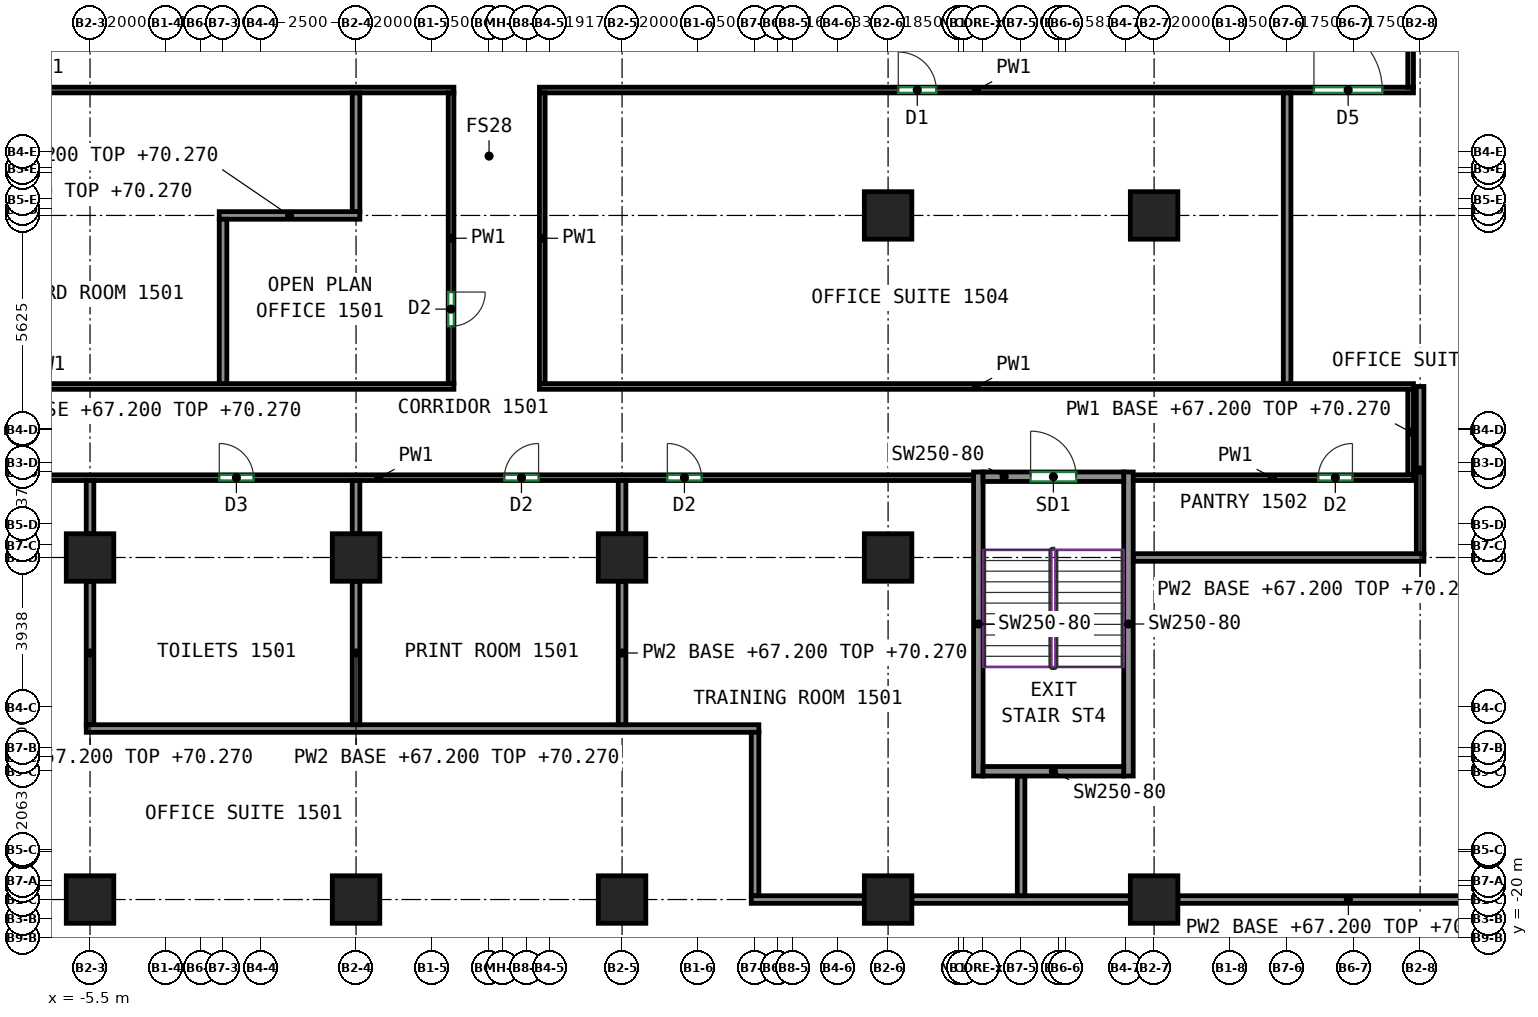
"""IFC4 building model, lengths in metres.
Left out: names, types, materials, properties, quantities, classifications, styles, units other than length and angle.
Written with IfcOpenShell. Run it as: python <this file> out.ifc"""

import sys

from ifc_helpers import new_model, si_unit, direction, frame, frame_2d, origin, origin_2d, place, context, subcontext, project, spatial, rectangle, extrude, source, transform, mapped, element, fill, save


model = new_model("IFC4")
c1 = context("Model", 3, precision=1e-05, world=origin(), true_north=direction((0.0, 1.0)))
c2 = subcontext(c1, "Body", "Model", "MODEL_VIEW")
j1 = project(units=[si_unit("LENGTHUNIT", "METRE"), si_unit("PLANEANGLEUNIT", "RADIAN")], contexts=[c1])
p1 = place(None, origin())
s1 = spatial("IfcSite", under=j1, at=p1, CompositionType="ELEMENT")
p2 = place(p1, origin())
s2 = spatial("IfcBuilding", under=s1, at=p2, CompositionType="ELEMENT")
p3 = place(p2, frame((0.0, 0.0, 67.2)))
s3 = spatial("IfcBuildingStorey", under=s2, at=p3, CompositionType="ELEMENT", Elevation=67.2)
m1 = source(origin(), c2, "Body", "SweptSolid", [
    extrude(rectangle(XDim=1.25, YDim=1.25, at=origin_2d()), origin(), (0.0, 0.0, 1.0), 3.72),
])
for number, where, z_axis, x_axis in (
    (1, (-5.5, -19.0, 0.0), (0.0, 0.0, 1.0), (1.0, 0.0, 0.0)),
    (2, (-5.5, -10.0, 0.0), (0.0, 0.0, 1.0), (1.0, 0.0, 0.0)),
    (3, (1.5, -19.0, 0.0), (0.0, 0.0, 1.0), (1.0, 0.0, 0.0)),
    (4, (1.5, -10.0, 0.0), (0.0, 0.0, 1.0), (1.0, 0.0, 0.0)),
    (5, (8.5, -19.0, 0.0), (0.0, 0.0, 1.0), (1.0, 0.0, 0.0)),
    (6, (8.5, -10.0, 0.0), (0.0, 0.0, 1.0), (1.0, 0.0, 0.0)),
    (7, (15.5, -19.0, 0.0), (0.0, 0.0, 1.0), (1.0, 0.0, 0.0)),
    (8, (15.5, -10.0, 0.0), (0.0, 0.0, 1.0), (1.0, 0.0, 0.0)),
    (9, (15.5, -1.0, 0.0), (0.0, 0.0, 1.0), (1.0, 0.0, 0.0)),
    (10, (22.5, -19.0, 0.0), (0.0, 0.0, 1.0), (1.0, 0.0, 0.0)),
    (11, (22.5, -1.0, 0.0), (0.0, 0.0, 1.0), (1.0, 0.0, 0.0)),
):
    element("IfcColumn", number, at=place(p3, frame(where, z_axis=z_axis, x_axis=x_axis)), inside=s3, PredefinedType="COLUMN", context=c2, shape_type="MappedRepresentation", body=[
        mapped(m1, transform((0.0, 0.0, 0.0))),
    ])
m2 = source(origin(), c2, "Body", "SweptSolid", [
    extrude(rectangle(XDim=8.0, YDim=0.25, at=frame_2d((4.0, 0.0))), origin(), (0.0, 0.0, 1.0), 3.72),
])
for number, where, z_axis, x_axis in (
    (12, (17.875, -15.75, 0.0), (0.0, 0.0, 1.0), (0.0, 1.0, 0.0)),
    (13, (21.825, -15.75, 0.0), (0.0, 0.0, 1.0), (0.0, 1.0, 0.0)),
):
    element("IfcWall", number, at=place(p3, frame(where, z_axis=z_axis, x_axis=x_axis)), inside=s3, PredefinedType="SHEAR", context=c2, shape_type="MappedRepresentation", body=[
        mapped(m2, transform((0.0, 0.0, 0.0))),
    ])
m3 = source(origin(), c2, "Body", "SweptSolid", [
    extrude(rectangle(XDim=3.7, YDim=0.25, at=frame_2d((1.85, 0.0))), origin(), (0.0, 0.0, 1.0), 3.72),
])
p4 = place(p3, frame((18.0, -15.625, 0.0), z_axis=(0.0, 0.0, 1.0), x_axis=(1.0, 0.0, 0.0)))
e14 = element("IfcWall", 14, at=p4, inside=s3, PredefinedType="SHEAR", context=c2, shape_type="MappedRepresentation", body=[
    mapped(m3, transform((0.0, 0.0, 0.0))),
])
p5 = place(p3, frame((18.0, -7.875, 0.0), z_axis=(0.0, 0.0, 1.0), x_axis=(1.0, 0.0, 0.0)))
e15 = element("IfcWall", 15, at=p5, inside=s3, PredefinedType="SHEAR", context=c2, shape_type="MappedRepresentation", body=[
    mapped(m3, transform((0.0, 0.0, 0.0))),
])
p6 = place(p5, frame((1.25, 0.0, 0.0)))
e16 = element("IfcOpeningElement", 16, at=p6, cuts=e15, PredefinedType="OPENING", context=c2, shape_type="SweptSolid", body=[
    extrude(rectangle(XDim=1.2, YDim=2.1, at=frame_2d((0.6, 1.05))), frame((0.0, 0.135, 0.0), z_axis=(0.0, -1.0, 0.0), x_axis=(1.0, 0.0, 0.0)), (0.0, 0.0, 1.0), 0.27),
])
p7 = place(p3, frame((-13.6, -7.9, 0.0), z_axis=(0.0, 0.0, 1.0), x_axis=(1.0, 0.0, 0.0)))
e17 = element("IfcWall", 17, at=p7, inside=s3, PredefinedType="PARTITIONING", context=c2, shape_type="SweptSolid", body=[
    extrude(rectangle(XDim=31.4, YDim=0.15, at=frame_2d((15.7, 0.0))), origin(), (0.0, 0.0, 1.0), 3.72),
])
p8 = place(p7, frame((11.501, 0.0, 0.0)))
e18 = element("IfcOpeningElement", 18, at=p8, cuts=e17, PredefinedType="OPENING", context=c2, shape_type="SweptSolid", body=[
    extrude(rectangle(XDim=0.9, YDim=2.1, at=frame_2d((0.45, 1.05))), frame((0.0, 0.085, 0.0), z_axis=(0.0, -1.0, 0.0), x_axis=(1.0, 0.0, 0.0)), (0.0, 0.0, 1.0), 0.17),
])
p9 = place(p7, frame((19.003, 0.0, 0.0)))
e19 = element("IfcOpeningElement", 19, at=p9, cuts=e17, PredefinedType="OPENING", context=c2, shape_type="SweptSolid", body=[
    extrude(rectangle(XDim=0.9, YDim=2.1, at=frame_2d((0.45, 1.05))), frame((0.0, 0.085, 0.0), z_axis=(0.0, -1.0, 0.0), x_axis=(1.0, 0.0, 0.0)), (0.0, 0.0, 1.0), 0.17),
])
p10 = place(p7, frame((23.291, 0.0, 0.0)))
e20 = element("IfcOpeningElement", 20, at=p10, cuts=e17, PredefinedType="OPENING", context=c2, shape_type="SweptSolid", body=[
    extrude(rectangle(XDim=0.9, YDim=2.1, at=frame_2d((0.45, 1.05))), frame((0.0, 0.085, 0.0), z_axis=(0.0, -1.0, 0.0), x_axis=(1.0, 0.0, 0.0)), (0.0, 0.0, 1.0), 0.17),
])
p11 = place(p3, frame((-19.25, -5.5, 0.0), z_axis=(0.0, 0.0, 1.0), x_axis=(1.0, 0.0, 0.0)))
e21 = element("IfcWall", 21, at=p11, inside=s3, PredefinedType="PARTITIONING", context=c2, shape_type="SweptSolid", body=[
    extrude(rectangle(XDim=23.325, YDim=0.15, at=frame_2d((11.663, 0.0))), origin(), (0.0, 0.0, 1.0), 3.72),
])
p12 = place(p11, frame((9.06, 0.0, 0.0)))
e22 = element("IfcOpeningElement", 22, at=p12, cuts=e21, PredefinedType="OPENING", context=c2, shape_type="SweptSolid", body=[
    extrude(rectangle(XDim=0.9, YDim=2.1, at=frame_2d((0.45, 1.05))), frame((0.0, 0.085, 0.0), z_axis=(0.0, -1.0, 0.0), x_axis=(1.0, 0.0, 0.0)), (0.0, 0.0, 1.0), 0.17),
])
p13 = place(p3, frame((-19.325, 2.3, 0.0), z_axis=(0.0, 0.0, 1.0), x_axis=(1.0, 0.0, 0.0)))
e23 = element("IfcWall", 23, at=p13, inside=s3, PredefinedType="PARTITIONING", context=c2, shape_type="SweptSolid", body=[
    extrude(rectangle(XDim=23.4, YDim=0.15, at=frame_2d((11.7, 0.0))), origin(), (0.0, 0.0, 1.0), 3.72),
])
p14 = place(p13, frame((2.414, 0.0, 0.0)))
e24 = element("IfcOpeningElement", 24, at=p14, cuts=e23, PredefinedType="OPENING", context=c2, shape_type="SweptSolid", body=[
    extrude(rectangle(XDim=0.9, YDim=2.1, at=frame_2d((0.45, 1.05))), frame((0.0, 0.085, 0.0), z_axis=(0.0, -1.0, 0.0), x_axis=(1.0, 0.0, 0.0)), (0.0, 0.0, 1.0), 0.17),
])
p15 = place(p13, frame((7.115, 0.0, 0.0)))
e25 = element("IfcOpeningElement", 25, at=p15, cuts=e23, PredefinedType="OPENING", context=c2, shape_type="SweptSolid", body=[
    extrude(rectangle(XDim=0.9, YDim=2.1, at=frame_2d((0.45, 1.05))), frame((0.0, 0.085, 0.0), z_axis=(0.0, -1.0, 0.0), x_axis=(1.0, 0.0, 0.0)), (0.0, 0.0, 1.0), 0.17),
])
p16 = place(p3, frame((4.0, 2.225, 0.0), z_axis=(0.0, 0.0, 1.0), x_axis=(0.0, -1.0, 0.0)))
e26 = element("IfcWall", 26, at=p16, inside=s3, PredefinedType="PARTITIONING", context=c2, shape_type="SweptSolid", body=[
    extrude(rectangle(XDim=7.65, YDim=0.15, at=frame_2d((3.825, 0.0))), origin(), (0.0, 0.0, 1.0), 3.72),
])
p17 = place(p16, frame((5.24, 0.0, 0.0)))
e27 = element("IfcOpeningElement", 27, at=p17, cuts=e26, PredefinedType="OPENING", context=c2, shape_type="SweptSolid", body=[
    extrude(rectangle(XDim=0.9, YDim=2.1, at=frame_2d((0.45, 1.05))), frame((0.0, 0.085, 0.0), z_axis=(0.0, -1.0, 0.0), x_axis=(1.0, 0.0, 0.0)), (0.0, 0.0, 1.0), 0.17),
])
p18 = place(p3, frame((6.325, 2.3, 0.0), z_axis=(0.0, 0.0, 1.0), x_axis=(1.0, 0.0, 0.0)))
e28 = element("IfcWall", 28, at=p18, inside=s3, PredefinedType="PARTITIONING", context=c2, shape_type="SweptSolid", body=[
    extrude(rectangle(XDim=23.0, YDim=0.15, at=frame_2d((11.5, 0.0))), origin(), (0.0, 0.0, 1.0), 3.72),
])
p19 = place(p18, frame((9.443, 0.0, 0.0)))
e29 = element("IfcOpeningElement", 29, at=p19, cuts=e28, PredefinedType="OPENING", context=c2, shape_type="SweptSolid", body=[
    extrude(rectangle(XDim=1.0, YDim=2.1, at=frame_2d((0.5, 1.05))), frame((0.0, 0.085, 0.0), z_axis=(0.0, -1.0, 0.0), x_axis=(1.0, 0.0, 0.0)), (0.0, 0.0, 1.0), 0.17),
])
p20 = place(p18, frame((20.381, 0.0, 0.0)))
e30 = element("IfcOpeningElement", 30, at=p20, cuts=e28, PredefinedType="OPENING", context=c2, shape_type="SweptSolid", body=[
    extrude(rectangle(XDim=1.8, YDim=2.1, at=frame_2d((0.9, 1.05))), frame((0.0, 0.085, 0.0), z_axis=(0.0, -1.0, 0.0), x_axis=(1.0, 0.0, 0.0)), (0.0, 0.0, 1.0), 0.17),
])
p21 = place(p3, frame((6.4, -5.425, 0.0), z_axis=(0.0, 0.0, 1.0), x_axis=(0.0, 1.0, 0.0)))
e31 = element("IfcWall", 31, at=p21, inside=s3, PredefinedType="PARTITIONING", context=c2, shape_type="SweptSolid", body=[
    extrude(rectangle(XDim=7.65, YDim=0.15, at=frame_2d((3.825, 0.0))), origin(), (0.0, 0.0, 1.0), 3.72),
])
p22 = place(p3, frame((6.325, -5.5, 0.0), z_axis=(0.0, 0.0, 1.0), x_axis=(1.0, 0.0, 0.0)))
e32 = element("IfcWall", 32, at=p22, inside=s3, PredefinedType="PARTITIONING", context=c2, shape_type="SweptSolid", body=[
    extrude(rectangle(XDim=23.0, YDim=0.15, at=frame_2d((11.5, 0.0))), origin(), (0.0, 0.0, 1.0), 3.72),
])
p23 = place(p3, frame((29.25, -7.825, 0.0), z_axis=(0.0, 0.0, 1.0), x_axis=(0.0, 1.0, 0.0)))
e33 = element("IfcWall", 33, at=p23, inside=s3, PredefinedType="PARTITIONING", context=c2, shape_type="SweptSolid", body=[
    extrude(rectangle(XDim=2.25, YDim=0.15, at=frame_2d((1.125, 0.0))), origin(), (0.0, 0.0, 1.0), 3.07),
])
p24 = place(p3, frame((21.9, -7.9, 0.0), z_axis=(0.0, 0.0, 1.0), x_axis=(1.0, 0.0, 0.0)))
e34 = element("IfcWall", 34, at=p24, inside=s3, PredefinedType="PARTITIONING", context=c2, shape_type="SweptSolid", body=[
    extrude(rectangle(XDim=7.425, YDim=0.15, at=frame_2d((3.712, 0.0))), origin(), (0.0, 0.0, 1.0), 3.72),
])
p25 = place(p24, frame((4.919, 0.0, 0.0)))
e35 = element("IfcOpeningElement", 35, at=p25, cuts=e34, PredefinedType="OPENING", context=c2, shape_type="SweptSolid", body=[
    extrude(rectangle(XDim=0.9, YDim=2.1, at=frame_2d((0.45, 1.05))), frame((0.0, 0.085, 0.0), z_axis=(0.0, -1.0, 0.0), x_axis=(1.0, 0.0, 0.0)), (0.0, 0.0, 1.0), 0.17),
])
p26 = place(p3, frame((29.25, 2.375, 0.0), z_axis=(0.0, 0.0, 1.0), x_axis=(0.0, 1.0, 0.0)))
e36 = element("IfcWall", 36, at=p26, inside=s3, PredefinedType="PARTITIONING", context=c2, shape_type="SweptSolid", body=[
    extrude(rectangle(XDim=2.25, YDim=0.15, at=frame_2d((1.125, 0.0))), origin(), (0.0, 0.0, 1.0), 3.07),
])
p27 = place(p3, frame((-5.5, -9.375, 0.0), z_axis=(0.0, 0.0, 1.0), x_axis=(0.0, 1.0, 0.0)))
e37 = element("IfcWall", 37, at=p27, inside=s3, PredefinedType="PARTITIONING", context=c2, shape_type="SweptSolid", body=[
    extrude(rectangle(XDim=1.399, YDim=0.2, at=frame_2d((0.699, 0.0))), origin(), (0.0, 0.0, 1.0), 3.72),
])
p28 = place(p3, frame((-5.5, -14.4, 0.0), z_axis=(0.0, 0.0, 1.0), x_axis=(0.0, 1.0, 0.0)))
e38 = element("IfcWall", 38, at=p28, inside=s3, PredefinedType="PARTITIONING", context=c2, shape_type="SweptSolid", body=[
    extrude(rectangle(XDim=3.775, YDim=0.2, at=frame_2d((1.887, 0.0))), origin(), (0.0, 0.0, 1.0), 3.07),
])
p29 = place(p3, frame((-5.6, -14.5, 0.0), z_axis=(0.0, 0.0, 1.0), x_axis=(1.0, 0.0, 0.0)))
e39 = element("IfcWall", 39, at=p29, inside=s3, PredefinedType="PARTITIONING", context=c2, shape_type="SweptSolid", body=[
    extrude(rectangle(XDim=17.7, YDim=0.2, at=frame_2d((8.85, 0.0))), origin(), (0.0, 0.0, 1.0), 3.72),
])
p30 = place(p3, frame((12.0, -18.9, 0.0), z_axis=(0.0, 0.0, 1.0), x_axis=(0.0, 1.0, 0.0)))
e40 = element("IfcWall", 40, at=p30, inside=s3, PredefinedType="PARTITIONING", context=c2, shape_type="SweptSolid", body=[
    extrude(rectangle(XDim=4.3, YDim=0.2, at=frame_2d((2.15, 0.0))), origin(), (0.0, 0.0, 1.0), 3.72),
])
p31 = place(p3, frame((11.9, -19.0, 0.0), z_axis=(0.0, 0.0, 1.0), x_axis=(1.0, 0.0, 0.0)))
e41 = element("IfcWall", 41, at=p31, inside=s3, PredefinedType="PARTITIONING", context=c2, shape_type="SweptSolid", body=[
    extrude(rectangle(XDim=2.975, YDim=0.2, at=frame_2d((1.488, 0.0))), origin(), (0.0, 0.0, 1.0), 3.72),
])
p32 = place(p3, frame((16.125, -19.0, 0.0), z_axis=(0.0, 0.0, 1.0), x_axis=(1.0, 0.0, 0.0)))
e42 = element("IfcWall", 42, at=p32, inside=s3, PredefinedType="PARTITIONING", context=c2, shape_type="SweptSolid", body=[
    extrude(rectangle(XDim=5.75, YDim=0.2, at=frame_2d((2.875, 0.0))), origin(), (0.0, 0.0, 1.0), 3.72),
])
p33 = place(p3, frame((23.125, -19.0, 0.0), z_axis=(0.0, 0.0, 1.0), x_axis=(1.0, 0.0, 0.0)))
e43 = element("IfcWall", 43, at=p33, inside=s3, PredefinedType="PARTITIONING", context=c2, shape_type="SweptSolid", body=[
    extrude(rectangle(XDim=8.975, YDim=0.2, at=frame_2d((4.488, 0.0))), origin(), (0.0, 0.0, 1.0), 3.07),
])
p34 = place(p3, frame((1.5, -0.9, 0.0), z_axis=(0.0, 0.0, 1.0), x_axis=(0.0, 1.0, 0.0)))
e44 = element("IfcWall", 44, at=p34, inside=s3, PredefinedType="PARTITIONING", context=c2, shape_type="SweptSolid", body=[
    extrude(rectangle(XDim=3.124, YDim=0.2, at=frame_2d((1.562, 0.0))), origin(), (0.0, 0.0, 1.0), 3.72),
])
p35 = place(p3, frame((-2.1, -1.0, 0.0), z_axis=(0.0, 0.0, 1.0), x_axis=(1.0, 0.0, 0.0)))
e45 = element("IfcWall", 45, at=p35, inside=s3, PredefinedType="PARTITIONING", context=c2, shape_type="SweptSolid", body=[
    extrude(rectangle(XDim=3.7, YDim=0.2, at=frame_2d((1.85, 0.0))), origin(), (0.0, 0.0, 1.0), 3.07),
])
p36 = place(p3, frame((-2.0, -5.424, 0.0), z_axis=(0.0, 0.0, 1.0), x_axis=(0.0, 1.0, 0.0)))
e46 = element("IfcWall", 46, at=p36, inside=s3, PredefinedType="PARTITIONING", context=c2, shape_type="SweptSolid", body=[
    extrude(rectangle(XDim=4.324, YDim=0.2, at=frame_2d((2.162, 0.0))), origin(), (0.0, 0.0, 1.0), 3.72),
])
p37 = place(p3, frame((1.5, -9.375, 0.0), z_axis=(0.0, 0.0, 1.0), x_axis=(0.0, 1.0, 0.0)))
e47 = element("IfcWall", 47, at=p37, inside=s3, PredefinedType="PARTITIONING", context=c2, shape_type="SweptSolid", body=[
    extrude(rectangle(XDim=1.399, YDim=0.2, at=frame_2d((0.699, 0.0))), origin(), (0.0, 0.0, 1.0), 3.72),
])
p38 = place(p3, frame((1.5, -14.4, 0.0), z_axis=(0.0, 0.0, 1.0), x_axis=(0.0, 1.0, 0.0)))
e48 = element("IfcWall", 48, at=p38, inside=s3, PredefinedType="PARTITIONING", context=c2, shape_type="SweptSolid", body=[
    extrude(rectangle(XDim=3.775, YDim=0.2, at=frame_2d((1.887, 0.0))), origin(), (0.0, 0.0, 1.0), 3.07),
])
p39 = place(p3, frame((8.5, -9.375, 0.0), z_axis=(0.0, 0.0, 1.0), x_axis=(0.0, 1.0, 0.0)))
e49 = element("IfcWall", 49, at=p39, inside=s3, PredefinedType="PARTITIONING", context=c2, shape_type="SweptSolid", body=[
    extrude(rectangle(XDim=1.399, YDim=0.2, at=frame_2d((0.699, 0.0))), origin(), (0.0, 0.0, 1.0), 3.72),
])
p40 = place(p3, frame((8.5, -14.4, 0.0), z_axis=(0.0, 0.0, 1.0), x_axis=(0.0, 1.0, 0.0)))
e50 = element("IfcWall", 50, at=p40, inside=s3, PredefinedType="PARTITIONING", context=c2, shape_type="SweptSolid", body=[
    extrude(rectangle(XDim=3.775, YDim=0.2, at=frame_2d((1.887, 0.0))), origin(), (0.0, 0.0, 1.0), 3.07),
])
p41 = place(p3, frame((26.0, -5.424, 0.0), z_axis=(0.0, 0.0, 1.0), x_axis=(0.0, 1.0, 0.0)))
e51 = element("IfcWall", 51, at=p41, inside=s3, PredefinedType="PARTITIONING", context=c2, shape_type="SweptSolid", body=[
    extrude(rectangle(XDim=7.648, YDim=0.2, at=frame_2d((3.824, 0.0))), origin(), (0.0, 0.0, 1.0), 3.72),
])
p42 = place(p3, frame((19.0, -18.9, 0.0), z_axis=(0.0, 0.0, 1.0), x_axis=(0.0, 1.0, 0.0)))
e52 = element("IfcWall", 52, at=p42, inside=s3, PredefinedType="PARTITIONING", context=c2, shape_type="SweptSolid", body=[
    extrude(rectangle(XDim=3.15, YDim=0.2, at=frame_2d((1.575, 0.0))), origin(), (0.0, 0.0, 1.0), 3.72),
])
p43 = place(p3, frame((29.5, -9.9, 0.0), z_axis=(0.0, 0.0, 1.0), x_axis=(0.0, 1.0, 0.0)))
e53 = element("IfcWall", 53, at=p43, inside=s3, PredefinedType="PARTITIONING", context=c2, shape_type="SweptSolid", body=[
    extrude(rectangle(XDim=4.4, YDim=0.2, at=frame_2d((2.2, 0.0))), origin(), (0.0, 0.0, 1.0), 3.07),
])
p44 = place(p3, frame((21.95, -10.0, 0.0), z_axis=(0.0, 0.0, 1.0), x_axis=(1.0, 0.0, 0.0)))
e54 = element("IfcWall", 54, at=p44, inside=s3, PredefinedType="PARTITIONING", context=c2, shape_type="SweptSolid", body=[
    extrude(rectangle(XDim=7.65, YDim=0.2, at=frame_2d((3.825, 0.0))), origin(), (0.0, 0.0, 1.0), 3.72),
])
p45 = place(p6, origin())
e55 = element("IfcDoor", 55, at=p45, inside=s3, OperationType="DOUBLE_DOOR_SINGLE_SWING", PredefinedType="DOOR", context=c2, shape_type="SweptSolid", body=[
    extrude(rectangle(XDim=1.2, YDim=2.1, at=frame_2d((0.6, 1.05))), frame((0.0, 0.025, 0.0), z_axis=(0.0, -1.0, 0.0), x_axis=(1.0, 0.0, 0.0)), (0.0, 0.0, 1.0), 0.05),
])
fill(e16, e55)
p46 = place(p8, origin())
e56 = element("IfcDoor", 56, at=p46, inside=s3, OperationType="SINGLE_SWING_LEFT", PredefinedType="DOOR", context=c2, shape_type="SweptSolid", body=[
    extrude(rectangle(XDim=0.9, YDim=2.1, at=frame_2d((0.45, 1.05))), frame((0.0, 0.025, 0.0), z_axis=(0.0, -1.0, 0.0), x_axis=(1.0, 0.0, 0.0)), (0.0, 0.0, 1.0), 0.05),
])
fill(e18, e56)
p47 = place(p9, origin())
e57 = element("IfcDoor", 57, at=p47, inside=s3, OperationType="SINGLE_SWING_RIGHT", PredefinedType="DOOR", context=c2, shape_type="SweptSolid", body=[
    extrude(rectangle(XDim=0.9, YDim=2.1, at=frame_2d((0.45, 1.05))), frame((0.0, 0.025, 0.0), z_axis=(0.0, -1.0, 0.0), x_axis=(1.0, 0.0, 0.0)), (0.0, 0.0, 1.0), 0.05),
])
fill(e19, e57)
p48 = place(p10, origin())
e58 = element("IfcDoor", 58, at=p48, inside=s3, OperationType="SINGLE_SWING_LEFT", PredefinedType="DOOR", context=c2, shape_type="SweptSolid", body=[
    extrude(rectangle(XDim=0.9, YDim=2.1, at=frame_2d((0.45, 1.05))), frame((0.0, 0.025, 0.0), z_axis=(0.0, -1.0, 0.0), x_axis=(1.0, 0.0, 0.0)), (0.0, 0.0, 1.0), 0.05),
])
fill(e20, e58)
p49 = place(p25, origin())
e59 = element("IfcDoor", 59, at=p49, inside=s3, OperationType="SINGLE_SWING_RIGHT", PredefinedType="DOOR", context=c2, shape_type="SweptSolid", body=[
    extrude(rectangle(XDim=0.9, YDim=2.1, at=frame_2d((0.45, 1.05))), frame((0.0, 0.025, 0.0), z_axis=(0.0, -1.0, 0.0), x_axis=(1.0, 0.0, 0.0)), (0.0, 0.0, 1.0), 0.05),
])
fill(e35, e59)
p50 = place(p17, origin())
e60 = element("IfcDoor", 60, at=p50, inside=s3, OperationType="SINGLE_SWING_LEFT", PredefinedType="DOOR", context=c2, shape_type="SweptSolid", body=[
    extrude(rectangle(XDim=0.9, YDim=2.1, at=frame_2d((0.45, 1.05))), frame((0.0, 0.025, 0.0), z_axis=(0.0, -1.0, 0.0), x_axis=(1.0, 0.0, 0.0)), (0.0, 0.0, 1.0), 0.05),
])
fill(e27, e60)
p51 = place(p19, origin())
e61 = element("IfcDoor", 61, at=p51, inside=s3, OperationType="SINGLE_SWING_LEFT", PredefinedType="DOOR", context=c2, shape_type="SweptSolid", body=[
    extrude(rectangle(XDim=1.0, YDim=2.1, at=frame_2d((0.5, 1.05))), frame((0.0, 0.025, 0.0), z_axis=(0.0, -1.0, 0.0), x_axis=(1.0, 0.0, 0.0)), (0.0, 0.0, 1.0), 0.05),
])
fill(e29, e61)
p52 = place(p20, origin())
e62 = element("IfcDoor", 62, at=p52, inside=s3, OperationType="DOUBLE_DOOR_SINGLE_SWING", PredefinedType="DOOR", context=c2, shape_type="SweptSolid", body=[
    extrude(rectangle(XDim=1.8, YDim=2.1, at=frame_2d((0.9, 1.05))), frame((0.0, 0.025, 0.0), z_axis=(0.0, -1.0, 0.0), x_axis=(1.0, 0.0, 0.0)), (0.0, 0.0, 1.0), 0.05),
])
fill(e30, e62)
save(model, sys.argv[1])
